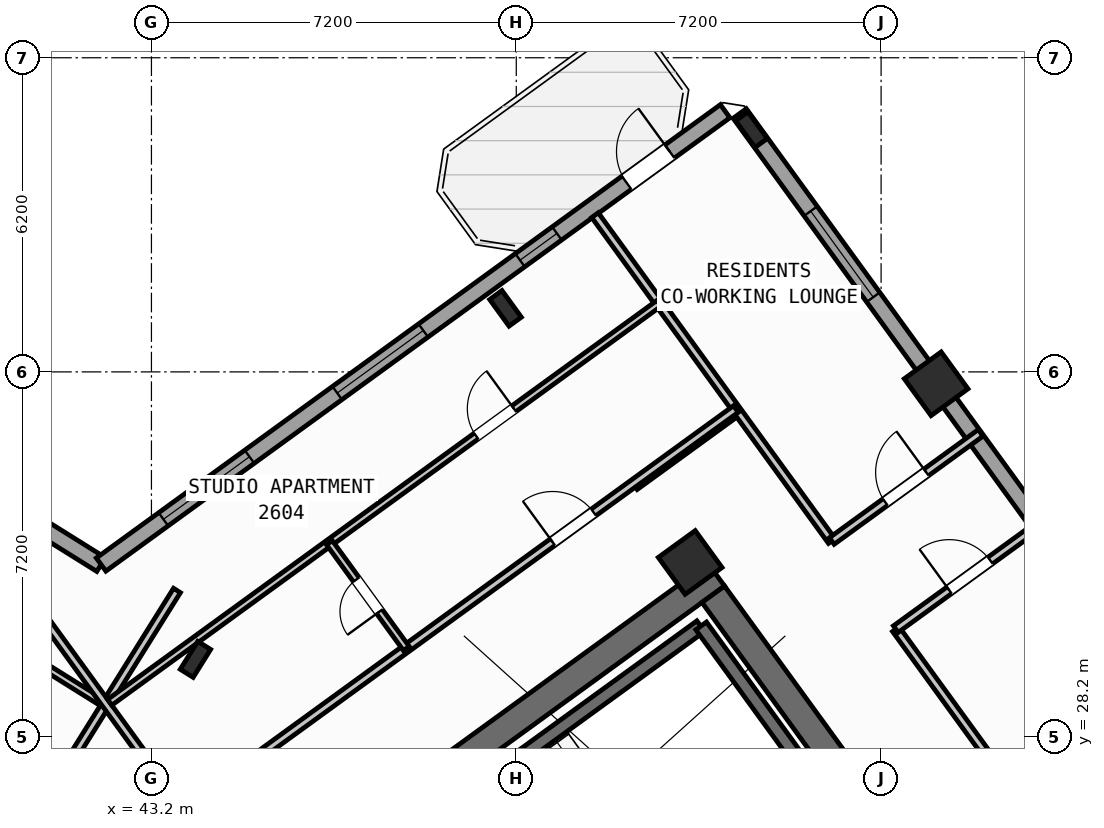
"""IFC4 building model, lengths in metres.
Left out: names, types, materials, properties, quantities, classifications, styles, units other than length and angle.
Written with IfcOpenShell. Run it as: python <this file> out.ifc"""

import sys

from ifc_helpers import new_model, si_unit, direction, frame, frame_2d, origin, origin_2d, place, context, subcontext, project, spatial, rectangle, hollow_rectangle, i_section, extrude, source, transform, mapped, element, fill, save


model = new_model("IFC4")
c1 = context("Model", 3, precision=1e-05, world=origin(), true_north=direction((0.0, 1.0)))
c2 = subcontext(c1, "Body", "Model", "MODEL_VIEW")
j1 = project(units=[si_unit("LENGTHUNIT", "METRE"), si_unit("PLANEANGLEUNIT", "RADIAN")], contexts=[c1])
p1 = place(None, origin())
s1 = spatial("IfcSite", under=j1, at=p1, CompositionType="ELEMENT")
p2 = place(p1, origin())
s2 = spatial("IfcBuilding", under=s1, at=p2, CompositionType="ELEMENT")
p3 = place(p2, frame((0.0, 0.0, 105.3)))
s3 = spatial("IfcBuildingStorey", under=s2, at=p3, CompositionType="ELEMENT", Elevation=105.3)
p4 = place(p3, frame((44.365, 24.142, 0.0), z_axis=(0.0, 0.0, 1.0), x_axis=(0.809024304885, 0.587775190107, 0.0)))
e1 = element("IfcWall", 1, at=p4, inside=s3, PredefinedType="SHEAR", context=c2, shape_type="SweptSolid", body=[
    extrude(rectangle(XDim=12.34, YDim=0.55, at=frame_2d((6.17, 0.0))), origin(), (0.0, 0.0, 1.0), 3.35),
])
p5 = place(p3, frame((58.064, 25.813, 0.0), z_axis=(0.0, 0.0, 1.0), x_axis=(-0.587764933797, 0.809031756236, 0.0)))
e2 = element("IfcWall", 2, at=p5, inside=s3, PredefinedType="SHEAR", context=c2, shape_type="SweptSolid", body=[
    extrude(rectangle(XDim=6.425, YDim=0.55, at=frame_2d((3.212, 0.0))), origin(), (0.0, 0.0, 1.0), 3.35),
])
m1 = source(origin(), c2, "Body", "SweptSolid", [
    extrude(i_section(OverallWidth=0.3, OverallDepth=0.65, WebThickness=0.016, FlangeThickness=0.031, at=origin_2d()), origin(), (0.0, 0.0, 1.0), 3.6),
])
p6 = place(p3, frame((44.068, 29.726, 0.0), z_axis=(0.0, 0.0, 1.0), x_axis=(-0.848048096156, 0.529919264233, 0.0)))
e3 = element("IfcColumn", 3, at=p6, inside=s3, PredefinedType="COLUMN", context=c2, shape_type="MappedRepresentation", body=[
    mapped(m1, transform((0.0, 0.0, 0.0), scale=1.0)),
])
m2 = source(origin(), c2, "Body", "SweptSolid", [
    extrude(hollow_rectangle(XDim=0.9, YDim=0.9, WallThickness=0.036, at=origin_2d()), origin(), (0.0, 0.0, 1.0), 3.6),
])
p7 = place(p3, frame((53.832, 31.638, 0.0), z_axis=(0.0, 0.0, 1.0), x_axis=(0.809016994375, 0.587785252292, 0.0)))
e4 = element("IfcColumn", 4, at=p7, inside=s3, PredefinedType="COLUMN", context=c2, shape_type="MappedRepresentation", body=[
    mapped(m2, transform((0.0, 0.0, 0.0), scale=1.0)),
])
p8 = place(p3, frame((50.188, 36.654, 0.0), z_axis=(0.0, 0.0, 1.0), x_axis=(0.809016994375, 0.587785252292, 0.0)))
e5 = element("IfcColumn", 5, at=p8, inside=s3, PredefinedType="COLUMN", context=c2, shape_type="MappedRepresentation", body=[
    mapped(m1, transform((0.0, 0.0, 0.0), scale=1.0)),
])
p9 = place(p3, frame((58.686, 35.165, 0.0), z_axis=(0.0, 0.0, 1.0), x_axis=(0.809016994375, 0.587785252292, 0.0)))
e6 = element("IfcColumn", 6, at=p9, inside=s3, PredefinedType="COLUMN", context=c2, shape_type="MappedRepresentation", body=[
    mapped(m2, transform((0.0, 0.0, 0.0), scale=1.0)),
])
p10 = place(p3, frame((55.042, 40.181, 0.0), z_axis=(0.0, 0.0, 1.0), x_axis=(0.809016994375, 0.587785252292, 0.0)))
e7 = element("IfcColumn", 7, at=p10, inside=s3, PredefinedType="COLUMN", context=c2, shape_type="MappedRepresentation", body=[
    mapped(m1, transform((0.0, 0.0, 0.0), scale=1.0)),
])
p11 = place(p3, frame((17.424, 47.083, 0.0), z_axis=(0.0, 0.0, 1.0), x_axis=(0.848049927979, -0.529916332693, 0.0)))
e8 = element("IfcWall", 8, at=p11, inside=s3, PredefinedType="STANDARD", context=c2, shape_type="SweptSolid", body=[
    extrude(rectangle(XDim=29.223, YDim=0.32, at=frame_2d((14.612, 0.0))), origin(), (0.0, 0.0, 1.0), 3.35),
])
p12 = place(p11, frame((3.709, 0.0, 0.0)))
e9 = element("IfcOpeningElement", 9, at=p12, cuts=e8, PredefinedType="OPENING", context=c2, shape_type="SweptSolid", body=[
    extrude(rectangle(XDim=1.05, YDim=2.15, at=frame_2d((0.525, 1.075))), frame((0.0, 0.17, 0.0), z_axis=(0.0, -1.0, 0.0), x_axis=(1.0, 0.0, 0.0)), (0.0, 0.0, 1.0), 0.34),
])
p13 = place(p11, frame((0.659, 0.0, 0.95)))
e10 = element("IfcOpeningElement", 10, at=p13, cuts=e8, PredefinedType="OPENING", context=c2, shape_type="SweptSolid", body=[
    extrude(rectangle(XDim=1.2, YDim=1.4, at=frame_2d((0.6, 0.7))), frame((0.0, 0.17, 0.0), z_axis=(0.0, -1.0, 0.0), x_axis=(1.0, 0.0, 0.0)), (0.0, 0.0, 1.0), 0.34),
])
p14 = place(p11, frame((6.972, 0.0, 1.0)))
e11 = element("IfcOpeningElement", 11, at=p14, cuts=e8, PredefinedType="OPENING", context=c2, shape_type="SweptSolid", body=[
    extrude(rectangle(XDim=0.9, YDim=1.25, at=frame_2d((0.45, 0.625))), frame((0.0, 0.17, 0.0), z_axis=(0.0, -1.0, 0.0), x_axis=(1.0, 0.0, 0.0)), (0.0, 0.0, 1.0), 0.34),
])
p15 = place(p11, frame((9.847, 0.0, 0.85)))
e12 = element("IfcOpeningElement", 12, at=p15, cuts=e8, PredefinedType="OPENING", context=c2, shape_type="SweptSolid", body=[
    extrude(rectangle(XDim=1.5, YDim=1.5, at=frame_2d((0.75, 0.75))), frame((0.0, 0.17, 0.0), z_axis=(0.0, -1.0, 0.0), x_axis=(1.0, 0.0, 0.0)), (0.0, 0.0, 1.0), 0.34),
])
p16 = place(p11, frame((13.889, 0.0, 0.95)))
e13 = element("IfcOpeningElement", 13, at=p16, cuts=e8, PredefinedType="OPENING", context=c2, shape_type="SweptSolid", body=[
    extrude(rectangle(XDim=1.2, YDim=1.4, at=frame_2d((0.6, 0.7))), frame((0.0, 0.17, 0.0), z_axis=(0.0, -1.0, 0.0), x_axis=(1.0, 0.0, 0.0)), (0.0, 0.0, 1.0), 0.34),
])
p17 = place(p11, frame((17.254, 0.0, 1.0)))
e14 = element("IfcOpeningElement", 14, at=p17, cuts=e8, PredefinedType="OPENING", context=c2, shape_type="SweptSolid", body=[
    extrude(rectangle(XDim=0.9, YDim=1.25, at=frame_2d((0.45, 0.625))), frame((0.0, 0.17, 0.0), z_axis=(0.0, -1.0, 0.0), x_axis=(1.0, 0.0, 0.0)), (0.0, 0.0, 1.0), 0.34),
])
p18 = place(p11, frame((20.764, 0.0, 0.8)))
e15 = element("IfcOpeningElement", 15, at=p18, cuts=e8, PredefinedType="OPENING", context=c2, shape_type="SweptSolid", body=[
    extrude(rectangle(XDim=2.1, YDim=1.55, at=frame_2d((1.05, 0.775))), frame((0.0, 0.17, 0.0), z_axis=(0.0, -1.0, 0.0), x_axis=(1.0, 0.0, 0.0)), (0.0, 0.0, 1.0), 0.34),
])
p19 = place(p11, frame((25.403, 0.0, 0.8)))
e16 = element("IfcOpeningElement", 16, at=p19, cuts=e8, PredefinedType="OPENING", context=c2, shape_type="SweptSolid", body=[
    extrude(rectangle(XDim=2.1, YDim=1.55, at=frame_2d((1.05, 0.775))), frame((0.0, 0.17, 0.0), z_axis=(0.0, -1.0, 0.0), x_axis=(1.0, 0.0, 0.0)), (0.0, 0.0, 1.0), 0.34),
])
p20 = place(p3, frame((42.207, 31.597, 0.0), z_axis=(0.0, 0.0, 1.0), x_axis=(0.809020333377, 0.587780656523, 0.0)))
e17 = element("IfcWall", 17, at=p20, inside=s3, PredefinedType="STANDARD", context=c2, shape_type="SweptSolid", body=[
    extrude(rectangle(XDim=15.223, YDim=0.32, at=frame_2d((7.611, 0.0))), origin(), (0.0, 0.0, 1.0), 3.35),
])
p21 = place(p20, frame((12.82, 0.0, 0.0)))
e18 = element("IfcOpeningElement", 18, at=p21, cuts=e17, PredefinedType="OPENING", context=c2, shape_type="SweptSolid", body=[
    extrude(rectangle(XDim=1.05, YDim=2.15, at=frame_2d((0.525, 1.075))), frame((0.0, 0.17, 0.0), z_axis=(0.0, -1.0, 0.0), x_axis=(1.0, 0.0, 0.0)), (0.0, 0.0, 1.0), 0.34),
])
p22 = place(p20, frame((1.52, 0.0, 0.8)))
e19 = element("IfcOpeningElement", 19, at=p22, cuts=e17, PredefinedType="OPENING", context=c2, shape_type="SweptSolid", body=[
    extrude(rectangle(XDim=2.1, YDim=1.55, at=frame_2d((1.05, 0.775))), frame((0.0, 0.17, 0.0), z_axis=(0.0, -1.0, 0.0), x_axis=(1.0, 0.0, 0.0)), (0.0, 0.0, 1.0), 0.34),
])
p23 = place(p20, frame((5.76, 0.0, 0.8)))
e20 = element("IfcOpeningElement", 20, at=p23, cuts=e17, PredefinedType="OPENING", context=c2, shape_type="SweptSolid", body=[
    extrude(rectangle(XDim=2.1, YDim=1.55, at=frame_2d((1.05, 0.775))), frame((0.0, 0.17, 0.0), z_axis=(0.0, -1.0, 0.0), x_axis=(1.0, 0.0, 0.0)), (0.0, 0.0, 1.0), 0.34),
])
p24 = place(p20, frame((10.219, 0.0, 1.0)))
e21 = element("IfcOpeningElement", 21, at=p24, cuts=e17, PredefinedType="OPENING", context=c2, shape_type="SweptSolid", body=[
    extrude(rectangle(XDim=0.9, YDim=1.25, at=frame_2d((0.45, 0.625))), frame((0.0, 0.17, 0.0), z_axis=(0.0, -1.0, 0.0), x_axis=(1.0, 0.0, 0.0)), (0.0, 0.0, 1.0), 0.34),
])
p25 = place(p3, frame((54.81, 40.5, 0.0), z_axis=(0.0, 0.0, 1.0), x_axis=(0.587783625747, -0.809018176127, 0.0)))
e22 = element("IfcWall", 22, at=p25, inside=s3, PredefinedType="STANDARD", context=c2, shape_type="SweptSolid", body=[
    extrude(rectangle(XDim=21.587, YDim=0.32, at=frame_2d((10.794, 0.0))), origin(), (0.0, 0.0, 1.0), 2.775),
])
p26 = place(p25, frame((2.381, 0.0, 0.8)))
e23 = element("IfcOpeningElement", 23, at=p26, cuts=e22, PredefinedType="OPENING", context=c2, shape_type="SweptSolid", body=[
    extrude(rectangle(XDim=2.1, YDim=1.55, at=frame_2d((1.05, 0.775))), frame((0.0, 0.17, 0.0), z_axis=(0.0, -1.0, 0.0), x_axis=(1.0, 0.0, 0.0)), (0.0, 0.0, 1.0), 0.34),
])
p27 = place(p25, frame((10.934, 0.0, 0.85)))
e24 = element("IfcOpeningElement", 24, at=p27, cuts=e22, PredefinedType="OPENING", context=c2, shape_type="SweptSolid", body=[
    extrude(rectangle(XDim=1.8, YDim=1.5, at=frame_2d((0.9, 0.75))), frame((0.0, 0.17, 0.0), z_axis=(0.0, -1.0, 0.0), x_axis=(1.0, 0.0, 0.0)), (0.0, 0.0, 1.0), 0.34),
])
p28 = place(p25, frame((14.927, 0.0, 0.85)))
e25 = element("IfcOpeningElement", 25, at=p28, cuts=e22, PredefinedType="OPENING", context=c2, shape_type="SweptSolid", body=[
    extrude(rectangle(XDim=1.5, YDim=1.5, at=frame_2d((0.75, 0.75))), frame((0.0, 0.17, 0.0), z_axis=(0.0, -1.0, 0.0), x_axis=(1.0, 0.0, 0.0)), (0.0, 0.0, 1.0), 0.34),
])
p29 = place(p25, frame((18.432, 0.0, 0.95)))
e26 = element("IfcOpeningElement", 26, at=p29, cuts=e22, PredefinedType="OPENING", context=c2, shape_type="SweptSolid", body=[
    extrude(rectangle(XDim=1.2, YDim=1.4, at=frame_2d((0.6, 0.7))), frame((0.0, 0.17, 0.0), z_axis=(0.0, -1.0, 0.0), x_axis=(1.0, 0.0, 0.0)), (0.0, 0.0, 1.0), 0.34),
])
p30 = place(p3, frame((48.006, 25.996, 0.0), z_axis=(0.0, 0.0, 1.0), x_axis=(0.80901903764, 0.587782439969, 0.0)))
e27 = element("IfcWall", 27, at=p30, inside=s3, PredefinedType="SHEAR", context=c2, shape_type="SweptSolid", body=[
    extrude(rectangle(XDim=7.46, YDim=0.26, at=frame_2d((3.73, 0.0))), origin(), (0.0, 0.0, 1.0), 3.35),
])
p31 = place(p3, frame((55.906, 27.831, 0.0), z_axis=(0.0, 0.0, 1.0), x_axis=(-0.587804123638, 0.809003283204, 0.0)))
e28 = element("IfcWall", 28, at=p31, inside=s3, PredefinedType="SHEAR", context=c2, shape_type="SweptSolid", body=[
    extrude(rectangle(XDim=3.16, YDim=0.26, at=frame_2d((1.58, 0.0))), origin(), (0.0, 0.0, 1.0), 3.35),
])
p32 = place(p3, frame((41.936, 26.012, 0.0), z_axis=(0.0, 0.0, 1.0), x_axis=(-0.848051154596, 0.529914369676, 0.0)))
e29 = element("IfcWall", 29, at=p32, inside=s3, PredefinedType="PARTITIONING", context=c2, shape_type="SweptSolid", body=[
    extrude(rectangle(XDim=15.57, YDim=0.16, at=frame_2d((7.785, 0.0))), origin(), (0.0, 0.0, 1.0), 3.34),
])
p33 = place(p32, frame((10.83, 0.0, 0.0)))
e30 = element("IfcOpeningElement", 30, at=p33, cuts=e29, PredefinedType="OPENING", context=c2, shape_type="SweptSolid", body=[
    extrude(rectangle(XDim=1.0, YDim=2.1, at=frame_2d((0.5, 1.05))), frame((0.0, 0.09, 0.0), z_axis=(0.0, -1.0, 0.0), x_axis=(1.0, 0.0, 0.0)), (0.0, 0.0, 1.0), 0.18),
])
p34 = place(p3, frame((43.704, 31.086, 0.0), z_axis=(0.0, 0.0, 1.0), x_axis=(-0.529906828443, -0.848055866774, 0.0)))
e31 = element("IfcWall", 31, at=p34, inside=s3, PredefinedType="PARTITIONING", context=c2, shape_type="SweptSolid", body=[
    extrude(rectangle(XDim=5.48, YDim=0.16, at=frame_2d((2.74, 0.0))), origin(), (0.0, 0.0, 1.0), 3.34),
])
p35 = place(p3, frame((42.226, 28.873, 0.0), z_axis=(0.0, 0.0, 1.0), x_axis=(-0.848049134363, 0.529917602752, 0.0)))
e32 = element("IfcWall", 32, at=p35, inside=s3, PredefinedType="PLUMBINGWALL", context=c2, shape_type="SweptSolid", body=[
    extrude(rectangle(XDim=14.3, YDim=0.14, at=frame_2d((7.15, 0.0))), origin(), (0.0, 0.0, 1.0), 3.34),
])
p36 = place(p35, frame((9.57, 0.0, 0.0)))
e33 = element("IfcOpeningElement", 33, at=p36, cuts=e32, PredefinedType="OPENING", context=c2, shape_type="SweptSolid", body=[
    extrude(rectangle(XDim=0.92, YDim=2.08, at=frame_2d((0.46, 1.04))), frame((0.0, 0.08, 0.0), z_axis=(0.0, -1.0, 0.0), x_axis=(1.0, 0.0, 0.0)), (0.0, 0.0, 1.0), 0.16),
])
p37 = place(p3, frame((52.739, 33.143, 0.0), z_axis=(0.0, 0.0, 1.0), x_axis=(0.809000999347, 0.58780726693, 0.0)))
e34 = element("IfcWall", 34, at=p37, inside=s3, PredefinedType="PARTITIONING", context=c2, shape_type="SweptSolid", body=[
    extrude(rectangle(XDim=2.51, YDim=0.16, at=frame_2d((1.255, 0.0))), origin(), (0.0, 0.0, 1.0), 3.34),
])
p38 = place(p3, frame((64.709, 20.938, 0.0), z_axis=(0.0, 0.0, 1.0), x_axis=(-0.587781191743, 0.809019944521, 0.0)))
e35 = element("IfcWall", 35, at=p38, inside=s3, PredefinedType="PARTITIONING", context=c2, shape_type="SweptSolid", body=[
    extrude(rectangle(XDim=11.6, YDim=0.16, at=frame_2d((5.8, 0.0))), origin(), (0.0, 0.0, 1.0), 3.34),
])
p39 = place(p3, frame((56.627, 32.062, 0.0), z_axis=(0.0, 0.0, 1.0), x_axis=(-0.587769918433, 0.809028134854, 0.0)))
e36 = element("IfcWall", 36, at=p39, inside=s3, PredefinedType="PARTITIONING", context=c2, shape_type="SweptSolid", body=[
    extrude(rectangle(XDim=7.95, YDim=0.16, at=frame_2d((3.975, 0.0))), origin(), (0.0, 0.0, 1.0), 3.34),
])
p40 = place(p3, frame((57.89, 30.323, 0.0), z_axis=(0.0, 0.0, 1.0), x_axis=(0.809035546126, 0.58775971715, 0.0)))
e37 = element("IfcWall", 37, at=p40, inside=s3, PredefinedType="PARTITIONING", context=c2, shape_type="SweptSolid", body=[
    extrude(rectangle(XDim=3.63, YDim=0.16, at=frame_2d((1.815, 0.0))), origin(), (0.0, 0.0, 1.0), 3.34),
])
p41 = place(p40, frame((1.305, 0.0, 0.0)))
e38 = element("IfcOpeningElement", 38, at=p41, cuts=e37, PredefinedType="OPENING", context=c2, shape_type="SweptSolid", body=[
    extrude(rectangle(XDim=1.0, YDim=2.1, at=frame_2d((0.5, 1.05))), frame((0.0, 0.09, 0.0), z_axis=(0.0, -1.0, 0.0), x_axis=(1.0, 0.0, 0.0)), (0.0, 0.0, 1.0), 0.18),
])
p42 = place(p3, frame((56.627, 32.062, 0.0), z_axis=(0.0, 0.0, 1.0), x_axis=(0.809003564202, 0.587803736896, 0.0)))
e39 = element("IfcWall", 39, at=p42, inside=s3, PredefinedType="PARTITIONING", context=c2, shape_type="SweptSolid", body=[
    extrude(rectangle(XDim=3.63, YDim=0.16, at=frame_2d((1.815, 0.0))), origin(), (0.0, 0.0, 1.0), 3.34),
])
p43 = place(p42, frame((1.305, 0.0, 0.0)))
e40 = element("IfcOpeningElement", 40, at=p43, cuts=e39, PredefinedType="OPENING", context=c2, shape_type="SweptSolid", body=[
    extrude(rectangle(XDim=1.0, YDim=2.1, at=frame_2d((0.5, 1.05))), frame((0.0, 0.09, 0.0), z_axis=(0.0, -1.0, 0.0), x_axis=(1.0, 0.0, 0.0)), (0.0, 0.0, 1.0), 0.18),
])
p44 = place(p3, frame((42.866, 26.044, 0.0), z_axis=(0.0, 0.0, 1.0), x_axis=(0.809020254154, 0.587780765566, 0.0)))
e41 = element("IfcWall", 41, at=p44, inside=s3, PredefinedType="PARTITIONING", context=c2, shape_type="SweptSolid", body=[
    extrude(rectangle(XDim=14.67, YDim=0.16, at=frame_2d((7.335, 0.0))), origin(), (0.0, 0.0, 1.0), 3.34),
])
p45 = place(p44, frame((10.2, 0.0, 0.0)))
e42 = element("IfcOpeningElement", 42, at=p45, cuts=e41, PredefinedType="OPENING", context=c2, shape_type="SweptSolid", body=[
    extrude(rectangle(XDim=1.0, YDim=2.1, at=frame_2d((0.5, 1.05))), frame((0.0, 0.09, 0.0), z_axis=(0.0, -1.0, 0.0), x_axis=(1.0, 0.0, 0.0)), (0.0, 0.0, 1.0), 0.18),
])
p46 = place(p3, frame((43.969, 26.55, 0.0), z_axis=(0.0, 0.0, 1.0), x_axis=(-0.587776919386, 0.80902304852, 0.0)))
e43 = element("IfcWall", 43, at=p46, inside=s3, PredefinedType="PARTITIONING", context=c2, shape_type="SweptSolid", body=[
    extrude(rectangle(XDim=5.48, YDim=0.16, at=frame_2d((2.74, 0.0))), origin(), (0.0, 0.0, 1.0), 3.34),
])
p47 = place(p3, frame((42.377, 28.878, 0.0), z_axis=(0.0, 0.0, 1.0), x_axis=(0.809020411523, 0.587780548963, 0.0)))
e44 = element("IfcWall", 44, at=p47, inside=s3, PredefinedType="PLUMBINGWALL", context=c2, shape_type="SweptSolid", body=[
    extrude(rectangle(XDim=13.4, YDim=0.14, at=frame_2d((6.7, 0.0))), origin(), (0.0, 0.0, 1.0), 3.34),
])
p48 = place(p47, frame((8.94, 0.0, 0.0)))
e45 = element("IfcOpeningElement", 45, at=p48, cuts=e44, PredefinedType="OPENING", context=c2, shape_type="SweptSolid", body=[
    extrude(rectangle(XDim=0.92, YDim=2.08, at=frame_2d((0.46, 1.04))), frame((0.0, 0.08, 0.0), z_axis=(0.0, -1.0, 0.0), x_axis=(1.0, 0.0, 0.0)), (0.0, 0.0, 1.0), 0.16),
])
p49 = place(p3, frame((48.229, 29.941, 0.0), z_axis=(0.0, 0.0, 1.0), x_axis=(-0.587772116736, 0.809026537752, 0.0)))
e46 = element("IfcWall", 46, at=p49, inside=s3, PredefinedType="PLUMBINGWALL", context=c2, shape_type="SweptSolid", body=[
    extrude(rectangle(XDim=2.58, YDim=0.14, at=frame_2d((1.29, 0.0))), origin(), (0.0, 0.0, 1.0), 3.34),
])
p50 = place(p49, frame((0.9, 0.0, 0.0)))
e47 = element("IfcOpeningElement", 47, at=p50, cuts=e46, PredefinedType="OPENING", context=c2, shape_type="SweptSolid", body=[
    extrude(rectangle(XDim=0.78, YDim=2.05, at=frame_2d((0.39, 1.025))), frame((0.0, 0.08, 0.0), z_axis=(0.0, -1.0, 0.0), x_axis=(1.0, 0.0, 0.0)), (0.0, 0.0, 1.0), 0.16),
])
m3 = source(origin(), c2, "Body", "SweptSolid", [
    extrude(rectangle(XDim=1.05, YDim=2.15, at=frame_2d((0.525, 1.075))), frame((0.0, 0.025, 0.0), z_axis=(0.0, -1.0, 0.0), x_axis=(1.0, 0.0, 0.0)), (0.0, 0.0, 1.0), 0.05),
])
p51 = place(p21, origin())
e48 = element("IfcDoor", 48, at=p51, inside=s3, OperationType="SINGLE_SWING_RIGHT", PredefinedType="DOOR", context=c2, shape_type="MappedRepresentation", body=[
    mapped(m3, transform((0.0, 0.0, 0.0), scale=1.0)),
])
fill(e18, e48)
m4 = source(origin(), c2, "Body", "SweptSolid", [
    extrude(rectangle(XDim=2.1, YDim=1.55, at=frame_2d((1.05, 0.775))), frame((0.0, 0.03, 0.0), z_axis=(0.0, -1.0, 0.0), x_axis=(1.0, 0.0, 0.0)), (0.0, 0.0, 1.0), 0.06),
])
p52 = place(p22, origin())
e49 = element("IfcWindow", 49, at=p52, inside=s3, PartitioningType="SINGLE_PANEL", PredefinedType="WINDOW", context=c2, shape_type="MappedRepresentation", body=[
    mapped(m4, transform((0.0, 0.0, 0.0), scale=1.0)),
])
fill(e19, e49)
p53 = place(p23, origin())
e50 = element("IfcWindow", 50, at=p53, inside=s3, PartitioningType="SINGLE_PANEL", PredefinedType="WINDOW", context=c2, shape_type="MappedRepresentation", body=[
    mapped(m4, transform((0.0, 0.0, 0.0), scale=1.0)),
])
fill(e20, e50)
m5 = source(origin(), c2, "Body", "SweptSolid", [
    extrude(rectangle(XDim=0.9, YDim=1.25, at=frame_2d((0.45, 0.625))), frame((0.0, 0.03, 0.0), z_axis=(0.0, -1.0, 0.0), x_axis=(1.0, 0.0, 0.0)), (0.0, 0.0, 1.0), 0.06),
])
p54 = place(p24, origin())
e51 = element("IfcWindow", 51, at=p54, inside=s3, PartitioningType="SINGLE_PANEL", PredefinedType="WINDOW", context=c2, shape_type="MappedRepresentation", body=[
    mapped(m5, transform((0.0, 0.0, 0.0), scale=1.0)),
])
fill(e21, e51)
p55 = place(p26, origin())
e52 = element("IfcWindow", 52, at=p55, inside=s3, PartitioningType="SINGLE_PANEL", PredefinedType="WINDOW", context=c2, shape_type="MappedRepresentation", body=[
    mapped(m4, transform((0.0, 0.0, 0.0), scale=1.0)),
])
fill(e23, e52)
m6 = source(origin(), c2, "Body", "SweptSolid", [
    extrude(rectangle(XDim=1.0, YDim=2.1, at=frame_2d((0.5, 1.05))), frame((0.0, 0.025, 0.0), z_axis=(0.0, -1.0, 0.0), x_axis=(1.0, 0.0, 0.0)), (0.0, 0.0, 1.0), 0.05),
])
p56 = place(p43, origin())
e53 = element("IfcDoor", 53, at=p56, inside=s3, OperationType="SINGLE_SWING_RIGHT", PredefinedType="DOOR", context=c2, shape_type="MappedRepresentation", body=[
    mapped(m6, transform((0.0, 0.0, 0.0), scale=1.0)),
])
fill(e40, e53)
p57 = place(p41, origin())
e54 = element("IfcDoor", 54, at=p57, inside=s3, OperationType="SINGLE_SWING_LEFT", PredefinedType="DOOR", context=c2, shape_type="MappedRepresentation", body=[
    mapped(m6, transform((0.0, 0.0, 0.0), scale=1.0)),
])
fill(e38, e54)
p58 = place(p45, origin())
e55 = element("IfcDoor", 55, at=p58, inside=s3, OperationType="SINGLE_SWING_LEFT", PredefinedType="DOOR", context=c2, shape_type="MappedRepresentation", body=[
    mapped(m6, transform((0.0, 0.0, 0.0), scale=1.0)),
])
fill(e42, e55)
m7 = source(origin(), c2, "Body", "SweptSolid", [
    extrude(rectangle(XDim=0.92, YDim=2.08, at=frame_2d((0.46, 1.04))), frame((0.0, 0.025, 0.0), z_axis=(0.0, -1.0, 0.0), x_axis=(1.0, 0.0, 0.0)), (0.0, 0.0, 1.0), 0.05),
])
p59 = place(p48, origin())
e56 = element("IfcDoor", 56, at=p59, inside=s3, OperationType="SINGLE_SWING_RIGHT", PredefinedType="DOOR", context=c2, shape_type="MappedRepresentation", body=[
    mapped(m7, transform((0.0, 0.0, 0.0), scale=1.0)),
])
fill(e45, e56)
m8 = source(origin(), c2, "Body", "SweptSolid", [
    extrude(rectangle(XDim=0.78, YDim=2.05, at=frame_2d((0.39, 1.025))), frame((0.0, 0.025, 0.0), z_axis=(0.0, -1.0, 0.0), x_axis=(1.0, 0.0, 0.0)), (0.0, 0.0, 1.0), 0.05),
])
p60 = place(p50, origin())
e57 = element("IfcDoor", 57, at=p60, inside=s3, OperationType="SINGLE_SWING_LEFT", PredefinedType="DOOR", context=c2, shape_type="MappedRepresentation", body=[
    mapped(m8, transform((0.0, 0.0, 0.0), scale=1.0)),
])
fill(e47, e57)
save(model, sys.argv[1])
